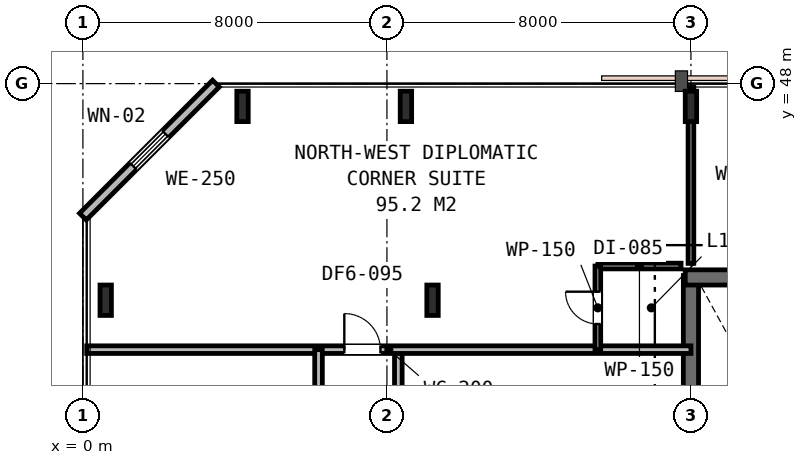
"""IFC4 building model, lengths in metres.
Left out: names, types, materials, properties, quantities, classifications, styles, units other than length and angle.
Written with IfcOpenShell. Run it as: python <this file> out.ifc"""

import sys

from ifc_helpers import new_model, si_unit, direction, frame, frame_2d, origin, origin_2d, place, context, subcontext, project, spatial, rectangle, i_section, extrude, element, fill, save


model = new_model("IFC4")
c1 = context("Model", 3, precision=1e-05, world=origin(), true_north=direction((0.0, 1.0)))
c2 = subcontext(c1, "Body", "Model", "MODEL_VIEW")
j1 = project(units=[si_unit("LENGTHUNIT", "METRE"), si_unit("PLANEANGLEUNIT", "RADIAN")], contexts=[c1])
p1 = place(None, origin())
s1 = spatial("IfcSite", under=j1, at=p1, CompositionType="ELEMENT")
p2 = place(p1, origin())
s2 = spatial("IfcBuilding", under=s1, at=p2, CompositionType="ELEMENT")
p3 = place(p2, frame((0.0, 0.0, 72.6)))
s3 = spatial("IfcBuildingStorey", under=s2, at=p3, CompositionType="ELEMENT", Elevation=72.6)
p4 = place(p3, frame((16.0, 30.65, 0.0), z_axis=(0.0, 0.0, 1.0), x_axis=(0.0, 1.0, 0.0)))
e1 = element("IfcWall", 1, at=p4, inside=s3, PredefinedType="SHEAR", context=c2, shape_type="SweptSolid", body=[
    extrude(rectangle(XDim=12.3, YDim=0.4, at=frame_2d((6.15, 0.0))), origin(), (0.0, 0.0, 1.0), 3.6),
])
p5 = place(p3, frame((15.85, 42.9, 0.0), z_axis=(0.0, 0.0, 1.0), x_axis=(1.0, 0.0, 0.0)))
e2 = element("IfcWall", 2, at=p5, inside=s3, PredefinedType="SHEAR", context=c2, shape_type="SweptSolid", body=[
    extrude(rectangle(XDim=24.3, YDim=0.4, at=frame_2d((12.15, 0.0))), origin(), (0.0, 0.0, 1.0), 3.6),
])
for number, where, z_axis, x_axis in (
    (3, (9.2, 42.3, 0.0), (0.0, 0.0, 1.0), (1.0, 0.0, 0.0)),
    (4, (0.6, 42.3, 0.0), (0.0, 0.0, 1.0), (1.0, 0.0, 0.0)),
    (5, (4.2, 47.4, 0.0), (0.0, 0.0, 1.0), (1.0, 0.0, 0.0)),
    (6, (8.5, 47.4, 0.0), (0.0, 0.0, 1.0), (1.0, 0.0, 0.0)),
    (7, (16.0, 47.4, 0.0), (0.0, 0.0, 1.0), (1.0, 0.0, 0.0)),
):
    element("IfcColumn", number, at=place(p3, frame(where, z_axis=z_axis, x_axis=x_axis)), inside=s3, PredefinedType="COLUMN", context=c2, shape_type="SweptSolid", body=[
        extrude(i_section(OverallWidth=0.3, OverallDepth=0.8, WebThickness=0.018, FlangeThickness=0.033, FilletRadius=0.03, at=origin_2d()), origin(), (0.0, 0.0, 1.0), 3.6),
    ])
p6 = place(p3, frame((3.5, 48.0, 0.0), z_axis=(0.0, 0.0, 1.0), x_axis=(-0.707106781187, -0.707106781187, 0.0)))
e8 = element("IfcWall", 8, at=p6, inside=s3, PredefinedType="STANDARD", context=c2, shape_type="SweptSolid", body=[
    extrude(rectangle(XDim=4.95, YDim=0.25, at=frame_2d((2.475, 0.0))), origin(), (0.0, 0.0, 1.0), 3.33),
])
p7 = place(p6, frame((1.875, 0.0, 0.85)))
e9 = element("IfcOpeningElement", 9, at=p7, cuts=e8, PredefinedType="OPENING", context=c2, shape_type="SweptSolid", body=[
    extrude(rectangle(XDim=1.2, YDim=1.6, at=frame_2d((0.6, 0.8))), frame((0.0, 0.135, 0.0), z_axis=(0.0, -1.0, 0.0), x_axis=(1.0, 0.0, 0.0)), (0.0, 0.0, 1.0), 0.27),
])
p8 = place(p3, frame((8.3, 30.8, 0.0), z_axis=(0.0, 0.0, 1.0), x_axis=(0.0, 1.0, 0.0)))
e10 = element("IfcWall", 10, at=p8, inside=s3, PredefinedType="PARTITIONING", context=c2, shape_type="SweptSolid", body=[
    extrude(rectangle(XDim=10.2, YDim=0.2, at=frame_2d((5.1, 0.0))), origin(), (0.0, 0.0, 1.0), 2.83),
])
p9 = place(p8, frame((1.95, 0.0, 0.0)))
e11 = element("IfcOpeningElement", 11, at=p9, cuts=e10, PredefinedType="OPENING", context=c2, shape_type="SweptSolid", body=[
    extrude(rectangle(XDim=0.9, YDim=2.15, at=frame_2d((0.45, 1.075))), frame((0.0, 0.11, 0.0), z_axis=(0.0, -1.0, 0.0), x_axis=(1.0, 0.0, 0.0)), (0.0, 0.0, 1.0), 0.22),
])
p10 = place(p8, frame((7.025, 0.0, 0.0)))
e12 = element("IfcOpeningElement", 12, at=p10, cuts=e10, PredefinedType="OPENING", context=c2, shape_type="SweptSolid", body=[
    extrude(rectangle(XDim=0.95, YDim=2.15, at=frame_2d((0.475, 1.075))), frame((0.0, 0.11, 0.0), z_axis=(0.0, -1.0, 0.0), x_axis=(1.0, 0.0, 0.0)), (0.0, 0.0, 1.0), 0.22),
])
p11 = place(p3, frame((0.1, 41.0, 0.0), z_axis=(0.0, 0.0, 1.0), x_axis=(1.0, 0.0, 0.0)))
e13 = element("IfcWall", 13, at=p11, inside=s3, PredefinedType="PARTITIONING", context=c2, shape_type="SweptSolid", body=[
    extrude(rectangle(XDim=15.9, YDim=0.2, at=frame_2d((7.95, 0.0))), origin(), (0.0, 0.0, 1.0), 2.83),
])
p12 = place(p11, frame((6.779, 0.0, 0.0)))
e14 = element("IfcOpeningElement", 14, at=p12, cuts=e13, PredefinedType="OPENING", context=c2, shape_type="SweptSolid", body=[
    extrude(rectangle(XDim=0.95, YDim=2.15, at=frame_2d((0.475, 1.075))), frame((0.0, 0.11, 0.0), z_axis=(0.0, -1.0, 0.0), x_axis=(1.0, 0.0, 0.0)), (0.0, 0.0, 1.0), 0.22),
])
p13 = place(p3, frame((13.55, 43.2, 0.0), z_axis=(0.0, 0.0, 1.0), x_axis=(1.0, 0.0, 0.0)))
e15 = element("IfcWall", 15, at=p13, inside=s3, PredefinedType="PARTITIONING", context=c2, shape_type="SweptSolid", body=[
    extrude(rectangle(XDim=2.19, YDim=0.15, at=frame_2d((1.095, 0.0))), origin(), (0.0, 0.0, 1.0), 3.33),
])
p14 = place(p3, frame((13.55, 41.0, 0.0), z_axis=(0.0, 0.0, 1.0), x_axis=(0.0, 1.0, 0.0)))
e16 = element("IfcWall", 16, at=p14, inside=s3, PredefinedType="PARTITIONING", context=c2, shape_type="SweptSolid", body=[
    extrude(rectangle(XDim=2.2, YDim=0.15, at=frame_2d((1.1, 0.0))), origin(), (0.0, 0.0, 1.0), 3.33),
])
p15 = place(p14, frame((0.675, 0.0, 0.0)))
e17 = element("IfcOpeningElement", 17, at=p15, cuts=e16, PredefinedType="OPENING", context=c2, shape_type="SweptSolid", body=[
    extrude(rectangle(XDim=0.85, YDim=2.15, at=frame_2d((0.425, 1.075))), frame((0.0, 0.085, 0.0), z_axis=(0.0, -1.0, 0.0), x_axis=(1.0, 0.0, 0.0)), (0.0, 0.0, 1.0), 0.17),
])
p16 = place(p3, frame((6.2, 28.6, 0.0), z_axis=(0.0, 0.0, 1.0), x_axis=(0.0, 1.0, 0.0)))
e18 = element("IfcWall", 18, at=p16, inside=s3, PredefinedType="PARTITIONING", context=c2, shape_type="SweptSolid", body=[
    extrude(rectangle(XDim=12.4, YDim=0.2, at=frame_2d((6.2, 0.0))), origin(), (0.0, 0.0, 1.0), 2.83),
])
p17 = place(p16, frame((3.725, 0.0, 0.0)))
e19 = element("IfcOpeningElement", 19, at=p17, cuts=e18, PredefinedType="OPENING", context=c2, shape_type="SweptSolid", body=[
    extrude(rectangle(XDim=0.95, YDim=2.15, at=frame_2d((0.475, 1.075))), frame((0.0, 0.11, 0.0), z_axis=(0.0, -1.0, 0.0), x_axis=(1.0, 0.0, 0.0)), (0.0, 0.0, 1.0), 0.22),
])
p18 = place(p16, frame((8.381, 0.0, 0.0)))
e20 = element("IfcOpeningElement", 20, at=p18, cuts=e18, PredefinedType="OPENING", context=c2, shape_type="SweptSolid", body=[
    extrude(rectangle(XDim=0.95, YDim=2.15, at=frame_2d((0.475, 1.075))), frame((0.0, 0.11, 0.0), z_axis=(0.0, -1.0, 0.0), x_axis=(1.0, 0.0, 0.0)), (0.0, 0.0, 1.0), 0.22),
])
p19 = place(p3, frame((16.0, 43.27, 0.0), z_axis=(0.0, 0.0, 1.0), x_axis=(0.0, 1.0, 0.0)))
e21 = element("IfcWall", 21, at=p19, inside=s3, PredefinedType="PARTITIONING", context=c2, shape_type="SweptSolid", body=[
    extrude(rectangle(XDim=4.63, YDim=0.15, at=frame_2d((2.315, 0.0))), origin(), (0.0, 0.0, 1.0), 2.92),
])
p20 = place(p7, origin())
e22 = element("IfcWindow", 22, at=p20, inside=s3, PartitioningType="SINGLE_PANEL", PredefinedType="WINDOW", context=c2, shape_type="SweptSolid", body=[
    extrude(rectangle(XDim=1.2, YDim=1.6, at=frame_2d((0.6, 0.8))), frame((0.0, 0.03, 0.0), z_axis=(0.0, -1.0, 0.0), x_axis=(1.0, 0.0, 0.0)), (0.0, 0.0, 1.0), 0.06),
])
fill(e9, e22)
p21 = place(p12, origin())
e23 = element("IfcDoor", 23, at=p21, inside=s3, OperationType="SINGLE_SWING_LEFT", PredefinedType="DOOR", context=c2, shape_type="SweptSolid", body=[
    extrude(rectangle(XDim=0.95, YDim=2.15, at=frame_2d((0.475, 1.075))), frame((0.0, 0.025, 0.0), z_axis=(0.0, -1.0, 0.0), x_axis=(1.0, 0.0, 0.0)), (0.0, 0.0, 1.0), 0.05),
])
fill(e14, e23)
p22 = place(p15, origin())
e24 = element("IfcDoor", 24, at=p22, inside=s3, OperationType="SINGLE_SWING_RIGHT", PredefinedType="DOOR", context=c2, shape_type="SweptSolid", body=[
    extrude(rectangle(XDim=0.85, YDim=2.15, at=frame_2d((0.425, 1.075))), frame((0.0, 0.025, 0.0), z_axis=(0.0, -1.0, 0.0), x_axis=(1.0, 0.0, 0.0)), (0.0, 0.0, 1.0), 0.05),
])
fill(e17, e24)
save(model, sys.argv[1])
